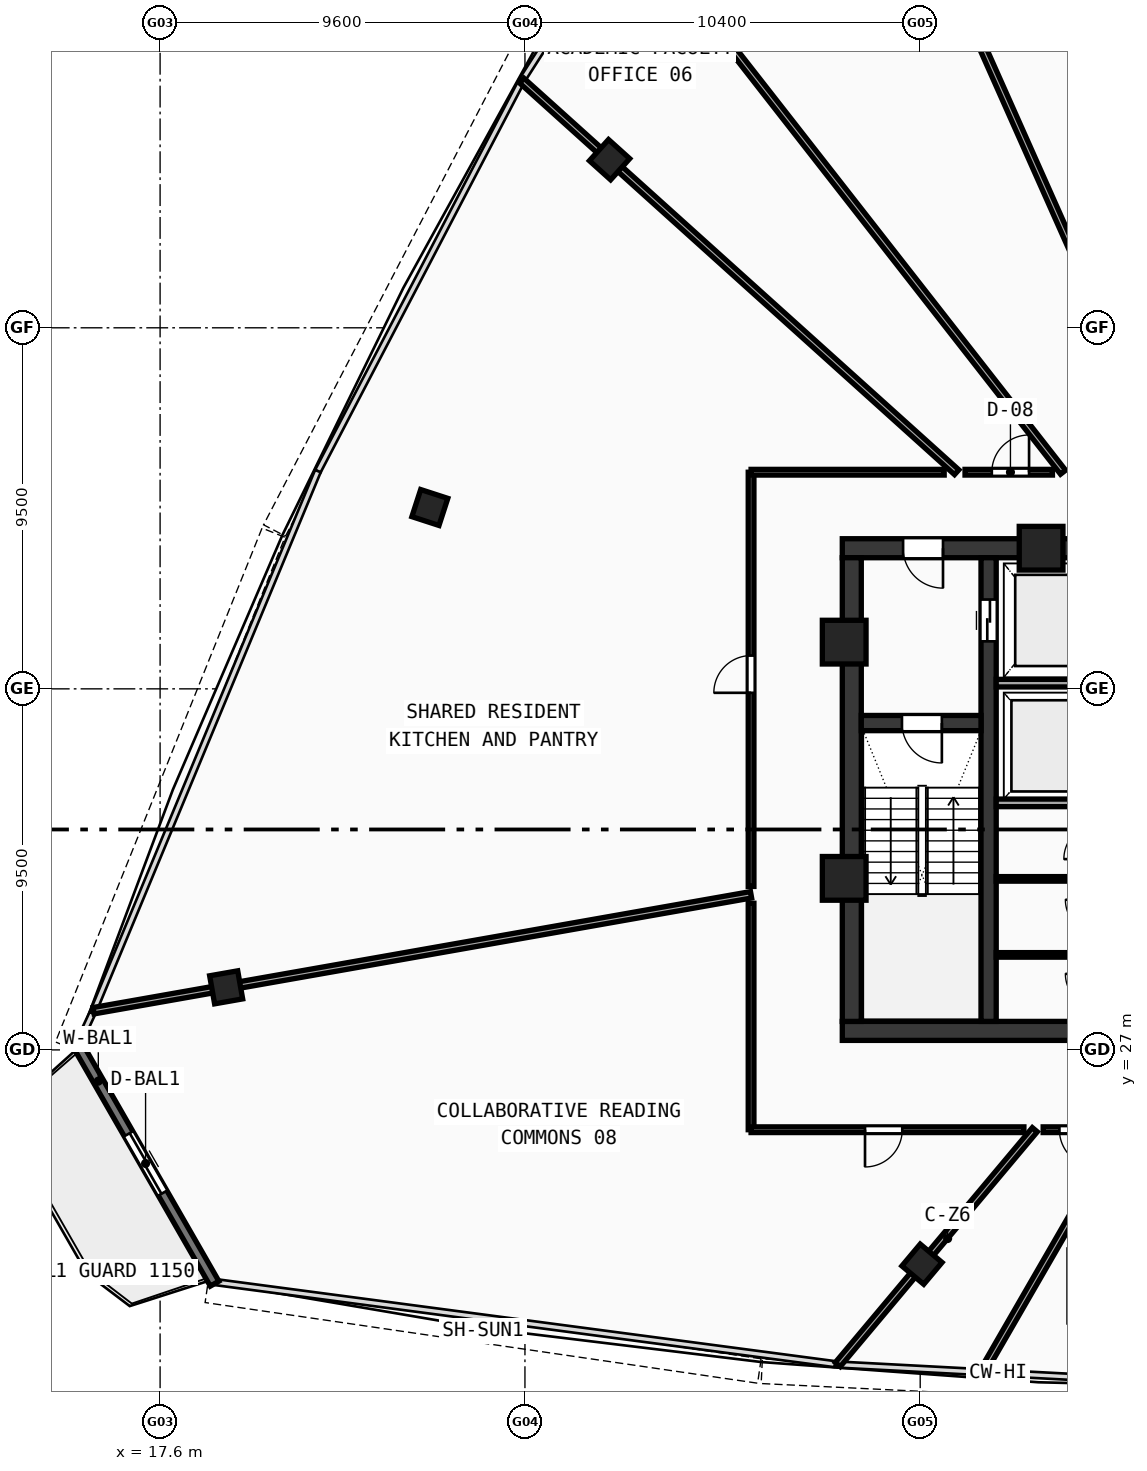
"""IFC4 building model, lengths in metres.
Left out: names, types, materials, properties, quantities, classifications, styles, units other than length and angle.
Written with IfcOpenShell. Run it as: python <this file> out.ifc"""

import sys

from ifc_helpers import new_model, si_unit, direction, frame, frame_2d, origin, origin_with_axes, origin_2d, place, context, subcontext, project, spatial, rectangle, hollow_rectangle, extrude, source, transform, mapped, element, fill, save


model = new_model("IFC4")
c1 = context("Model", 3, precision=1e-05, world=origin(), true_north=direction((0.0, 1.0)))
c2 = subcontext(c1, "Body", "Model", "MODEL_VIEW")
j1 = project(units=[si_unit("LENGTHUNIT", "METRE"), si_unit("PLANEANGLEUNIT", "RADIAN")], contexts=[c1])
p1 = place(None, origin())
s1 = spatial("IfcSite", under=j1, at=p1, CompositionType="ELEMENT")
p2 = place(p1, origin())
s2 = spatial("IfcBuilding", under=s1, at=p2, CompositionType="ELEMENT")
p3 = place(p2, frame((0.0, 0.0, 277.56)))
s3 = spatial("IfcBuildingStorey", under=s2, at=p3, CompositionType="ELEMENT", Elevation=277.56)
p4 = place(p3, frame((35.55, 27.5, 0.0), z_axis=(0.0, 0.0, 1.0), x_axis=(1.0, 0.0, 0.0)))
e1 = element("IfcWall", 1, at=p4, inside=s3, PredefinedType="SHEAR", context=c2, shape_type="SweptSolid", body=[
    extrude(rectangle(XDim=24.9, YDim=0.5, at=frame_2d((12.45, 0.0))), origin(), (0.0, 0.0, 1.0), 3.47),
])
p5 = place(p3, frame((35.55, 40.2, 0.0), z_axis=(0.0, 0.0, 1.0), x_axis=(1.0, 0.0, 0.0)))
e2 = element("IfcWall", 2, at=p5, inside=s3, PredefinedType="SHEAR", context=c2, shape_type="SweptSolid", body=[
    extrude(rectangle(XDim=11.25, YDim=0.5, at=frame_2d((5.625, 0.0))), origin(), (0.0, 0.0, 1.0), 3.47),
])
p6 = place(p5, frame((1.6, 0.0, 0.0)))
e3 = element("IfcOpeningElement", 3, at=p6, cuts=e2, PredefinedType="OPENING", context=c2, shape_type="SweptSolid", body=[
    extrude(rectangle(XDim=1.05, YDim=2.1, at=frame_2d((0.525, 1.05))), frame((0.0, 0.26, 0.0), z_axis=(0.0, -1.0, 0.0), x_axis=(1.0, 0.0, 0.0)), (0.0, 0.0, 1.0), 0.52),
])
p7 = place(p3, frame((35.8, 27.75, 0.0), z_axis=(0.0, 0.0, 1.0), x_axis=(0.0, 1.0, 0.0)))
e4 = element("IfcWall", 4, at=p7, inside=s3, PredefinedType="SHEAR", context=c2, shape_type="SweptSolid", body=[
    extrude(rectangle(XDim=12.2, YDim=0.5, at=frame_2d((6.1, 0.0))), origin(), (0.0, 0.0, 1.0), 3.47),
])
p8 = place(p3, frame((39.4, 27.75, 0.0), z_axis=(0.0, 0.0, 1.0), x_axis=(0.0, 1.0, 0.0)))
e5 = element("IfcWall", 5, at=p8, inside=s3, PredefinedType="SHEAR", context=c2, shape_type="SweptSolid", body=[
    extrude(rectangle(XDim=12.2, YDim=0.4, at=frame_2d((6.1, 0.0))), origin(), (0.0, 0.0, 1.0), 3.47),
])
p9 = place(p8, frame((10.0, 0.0, 0.0)))
e6 = element("IfcOpeningElement", 6, at=p9, cuts=e5, PredefinedType="OPENING", context=c2, shape_type="SweptSolid", body=[
    extrude(rectangle(XDim=1.1, YDim=2.1, at=frame_2d((0.55, 1.05))), frame((0.0, 0.21, 0.0), z_axis=(0.0, -1.0, 0.0), x_axis=(1.0, 0.0, 0.0)), (0.0, 0.0, 1.0), 0.42),
])
p10 = place(p3, frame((36.05, 35.6, 0.0), z_axis=(0.0, 0.0, 1.0), x_axis=(1.0, 0.0, 0.0)))
e7 = element("IfcWall", 7, at=p10, inside=s3, PredefinedType="SHEAR", context=c2, shape_type="SweptSolid", body=[
    extrude(rectangle(XDim=3.15, YDim=0.4, at=frame_2d((1.575, 0.0))), origin(), (0.0, 0.0, 1.0), 3.47),
])
p11 = place(p10, frame((1.07, 0.0, 0.0)))
e8 = element("IfcOpeningElement", 8, at=p11, cuts=e7, PredefinedType="OPENING", context=c2, shape_type="SweptSolid", body=[
    extrude(rectangle(XDim=1.05, YDim=2.1, at=frame_2d((0.525, 1.05))), frame((0.0, 0.21, 0.0), z_axis=(0.0, -1.0, 0.0), x_axis=(1.0, 0.0, 0.0)), (0.0, 0.0, 1.0), 0.42),
])
m1 = source(origin(), c2, "Body", "SweptSolid", [
    extrude(hollow_rectangle(XDim=1.15, YDim=1.15, WallThickness=0.048, at=origin_2d()), origin(), (0.0, 0.0, 1.0), 3.73),
])
for number, where, z_axis, x_axis in (
    (9, (40.781, 40.2, -0.26), (0.0, 0.0, 1.0), (1.0, 0.0, 0.0)),
    (10, (35.6, 37.729, -0.26), (0.0, 0.0, 1.0), (1.0, 0.0, 0.0)),
    (11, (35.6, 31.513, -0.26), (0.0, 0.0, 1.0), (1.0, 0.0, 0.0)),
):
    element("IfcColumn", number, at=place(p3, frame(where, z_axis=z_axis, x_axis=x_axis)), inside=s3, PredefinedType="COLUMN", context=c2, shape_type="MappedRepresentation", body=[
        mapped(m1, transform((0.0, 0.0, 0.0), scale=1.0)),
    ])
m2 = source(origin(), c2, "Body", "SweptSolid", [
    extrude(hollow_rectangle(XDim=0.75, YDim=0.75, WallThickness=0.028, at=origin_2d()), origin(), (0.0, 0.0, 1.0), 3.73),
])
for number, where, z_axis, x_axis in (
    (12, (37.647, 21.362, -0.26), (0.0, 0.0, 1.0), (0.766, -0.643, 0.0)),
    (13, (29.427, 50.424, -0.26), (0.0, 0.0, 1.0), (-0.669, -0.743, 0.0)),
    (14, (24.698, 41.271, -0.26), (0.0, 0.0, 1.0), (-0.309, -0.951, 0.0)),
    (15, (19.338, 28.646, -0.26), (0.0, 0.0, 1.0), (0.174, -0.985, 0.0)),
):
    element("IfcColumn", number, at=place(p3, frame(where, z_axis=z_axis, x_axis=x_axis)), inside=s3, PredefinedType="COLUMN", context=c2, shape_type="MappedRepresentation", body=[
        mapped(m2, transform((0.0, 0.0, 0.0), scale=1.0)),
    ])
p12 = place(p3, frame((15.402, 27.174, 0.0), z_axis=(0.0, 0.0, 1.0), x_axis=(0.497929527106, -0.867217496385, 0.0)))
e16 = element("IfcWall", 16, at=p12, inside=s3, PredefinedType="STANDARD", context=c2, shape_type="SweptSolid", body=[
    extrude(rectangle(XDim=7.293, YDim=0.26, at=frame_2d((3.647, 0.0))), origin(), (0.0, 0.0, 1.0), 3.47),
])
p13 = place(p12, frame((2.747, 0.0, 0.0)))
e17 = element("IfcOpeningElement", 17, at=p13, cuts=e16, PredefinedType="OPENING", context=c2, shape_type="SweptSolid", body=[
    extrude(rectangle(XDim=1.8, YDim=2.15, at=frame_2d((0.9, 1.075))), frame((0.0, 0.14, 0.0), z_axis=(0.0, -1.0, 0.0), x_axis=(1.0, 0.0, 0.0)), (0.0, 0.0, 1.0), 0.28),
])
for number, where, z_axis, x_axis in (
    (18, (39.6, 36.65, 0.0), (0.0, 0.0, 1.0), (1.0, 0.0, 0.0)),
    (19, (39.6, 33.5, 0.0), (0.0, 0.0, 1.0), (1.0, 0.0, 0.0)),
):
    element("IfcWall", number, at=place(p3, frame(where, z_axis=z_axis, x_axis=x_axis)), inside=s3, PredefinedType="SOLIDWALL", context=c2, shape_type="SweptSolid", body=[
        extrude(rectangle(XDim=2.72, YDim=0.2, at=frame_2d((1.36, 0.0))), origin(), (0.0, 0.0, 1.0), 3.47),
    ])
for number, where, z_axis, x_axis in (
    (20, (39.6, 29.5, 0.0), (0.0, 0.0, 1.0), (1.0, 0.0, 0.0)),
    (21, (39.6, 31.5, 0.0), (0.0, 0.0, 1.0), (1.0, 0.0, 0.0)),
):
    element("IfcWall", number, at=place(p3, frame(where, z_axis=z_axis, x_axis=x_axis)), inside=s3, PredefinedType="PARTITIONING", context=c2, shape_type="SweptSolid", body=[
        extrude(rectangle(XDim=2.72, YDim=0.12, at=frame_2d((1.36, 0.0))), origin(), (0.0, 0.0, 1.0), 3.47),
    ])
p14 = place(p3, frame((42.702, 45.6, 0.0), z_axis=(0.0, 0.0, 1.0), x_axis=(-0.406743072482, 0.91354259506, 0.0)))
e22 = element("IfcWall", 22, at=p14, inside=s3, PredefinedType="PARTITIONING", context=c2, shape_type="SweptSolid", body=[
    extrude(rectangle(XDim=20.191, YDim=0.17, at=frame_2d((10.096, 0.0))), origin(), (0.0, 0.0, 1.0), 2.87),
])
p15 = place(p3, frame((41.359, 42.2, 0.0), z_axis=(0.0, 0.0, 1.0), x_axis=(-0.615658553978, 0.788013036005, 0.0)))
e23 = element("IfcWall", 23, at=p15, inside=s3, PredefinedType="PARTITIONING", context=c2, shape_type="SweptSolid", body=[
    extrude(rectangle(XDim=18.609, YDim=0.17, at=frame_2d((9.304, 0.0))), origin(), (0.0, 0.0, 1.0), 2.87),
])
p16 = place(p3, frame((38.56, 42.2, 0.0), z_axis=(0.0, 0.0, 1.0), x_axis=(-0.743145118403, 0.669130281032, 0.0)))
e24 = element("IfcWall", 24, at=p16, inside=s3, PredefinedType="PARTITIONING", context=c2, shape_type="SweptSolid", body=[
    extrude(rectangle(XDim=15.397, YDim=0.17, at=frame_2d((7.699, 0.0))), origin(), (0.0, 0.0, 1.0), 2.87),
])
p17 = place(p3, frame((33.15, 31.082, 0.0), z_axis=(0.0, 0.0, 1.0), x_axis=(-0.984807054696, -0.173652137966, 0.0)))
e25 = element("IfcWall", 25, at=p17, inside=s3, PredefinedType="PARTITIONING", context=c2, shape_type="SweptSolid", body=[
    extrude(rectangle(XDim=17.567, YDim=0.17, at=frame_2d((8.783, 0.0))), origin(), (0.0, 0.0, 1.0), 2.87),
])
p18 = place(p3, frame((40.616, 24.9, 0.0), z_axis=(0.0, 0.0, 1.0), x_axis=(-0.642788791497, -0.76604345146, 0.0)))
e26 = element("IfcWall", 26, at=p18, inside=s3, PredefinedType="PARTITIONING", context=c2, shape_type="SweptSolid", body=[
    extrude(rectangle(XDim=8.066, YDim=0.17, at=frame_2d((4.033, 0.0))), origin(), (0.0, 0.0, 1.0), 2.87),
])
p19 = place(p3, frame((42.919, 24.9, 0.0), z_axis=(0.0, 0.0, 1.0), x_axis=(-0.499992114976, -0.866029956157, 0.0)))
e27 = element("IfcWall", 27, at=p19, inside=s3, PredefinedType="PARTITIONING", context=c2, shape_type="SweptSolid", body=[
    extrude(rectangle(XDim=7.367, YDim=0.17, at=frame_2d((3.683, 0.0))), origin(), (0.0, 0.0, 1.0), 2.87),
])
p20 = place(p3, frame((33.15, 24.9, 0.0), z_axis=(0.0, 0.0, 1.0), x_axis=(0.0, 1.0, 0.0)))
e28 = element("IfcWall", 28, at=p20, inside=s3, PredefinedType="PARTITIONING", context=c2, shape_type="SweptSolid", body=[
    extrude(rectangle(XDim=5.958, YDim=0.15, at=frame_2d((2.979, 0.0))), origin(), (0.0, 0.0, 1.0), 3.12),
])
p21 = place(p3, frame((33.15, 31.301, 0.0), z_axis=(0.0, 0.0, 1.0), x_axis=(0.0, 1.0, 0.0)))
e29 = element("IfcWall", 29, at=p21, inside=s3, PredefinedType="PARTITIONING", context=c2, shape_type="SweptSolid", body=[
    extrude(rectangle(XDim=10.899, YDim=0.15, at=frame_2d((5.449, 0.0))), origin(), (0.0, 0.0, 1.0), 2.87),
])
p22 = place(p21, frame((5.094, 0.0, 0.0)))
e30 = element("IfcOpeningElement", 30, at=p22, cuts=e29, PredefinedType="OPENING", context=c2, shape_type="SweptSolid", body=[
    extrude(rectangle(XDim=0.98, YDim=2.12, at=frame_2d((0.49, 1.06))), frame((0.0, 0.085, 0.0), z_axis=(0.0, -1.0, 0.0), x_axis=(1.0, 0.0, 0.0)), (0.0, 0.0, 1.0), 0.17),
])
p23 = place(p3, frame((33.15, 42.2, 0.0), z_axis=(0.0, 0.0, 1.0), x_axis=(1.0, 0.0, 0.0)))
e31 = element("IfcWall", 31, at=p23, inside=s3, PredefinedType="PARTITIONING", context=c2, shape_type="SweptSolid", body=[
    extrude(rectangle(XDim=5.081, YDim=0.15, at=frame_2d((2.541, 0.0))), origin(), (0.0, 0.0, 1.0), 3.12),
])
p24 = place(p3, frame((38.78, 42.2, 0.0), z_axis=(0.0, 0.0, 1.0), x_axis=(1.0, 0.0, 0.0)))
e32 = element("IfcWall", 32, at=p24, inside=s3, PredefinedType="PARTITIONING", context=c2, shape_type="SweptSolid", body=[
    extrude(rectangle(XDim=2.3, YDim=0.15, at=frame_2d((1.15, 0.0))), origin(), (0.0, 0.0, 1.0), 2.87),
])
p25 = place(p24, frame((0.705, 0.0, 0.0)))
e33 = element("IfcOpeningElement", 33, at=p25, cuts=e32, PredefinedType="OPENING", context=c2, shape_type="SweptSolid", body=[
    extrude(rectangle(XDim=0.98, YDim=2.12, at=frame_2d((0.49, 1.06))), frame((0.0, 0.085, 0.0), z_axis=(0.0, -1.0, 0.0), x_axis=(1.0, 0.0, 0.0)), (0.0, 0.0, 1.0), 0.17),
])
p26 = place(p3, frame((42.665, 24.9, 0.0), z_axis=(0.0, 0.0, 1.0), x_axis=(-1.0, 0.0, 0.0)))
e34 = element("IfcWall", 34, at=p26, inside=s3, PredefinedType="PARTITIONING", context=c2, shape_type="SweptSolid", body=[
    extrude(rectangle(XDim=1.83, YDim=0.15, at=frame_2d((0.915, 0.0))), origin(), (0.0, 0.0, 1.0), 3.47),
])
p27 = place(p26, frame((0.423, 0.0, 0.0)))
e35 = element("IfcOpeningElement", 35, at=p27, cuts=e34, PredefinedType="OPENING", context=c2, shape_type="SweptSolid", body=[
    extrude(rectangle(XDim=0.98, YDim=2.12, at=frame_2d((0.49, 1.06))), frame((0.0, 0.085, 0.0), z_axis=(0.0, -1.0, 0.0), x_axis=(1.0, 0.0, 0.0)), (0.0, 0.0, 1.0), 0.17),
])
p28 = place(p3, frame((40.329, 24.9, 0.0), z_axis=(0.0, 0.0, 1.0), x_axis=(-1.0, 0.0, 0.0)))
e36 = element("IfcWall", 36, at=p28, inside=s3, PredefinedType="PARTITIONING", context=c2, shape_type="SweptSolid", body=[
    extrude(rectangle(XDim=7.179, YDim=0.15, at=frame_2d((3.589, 0.0))), origin(), (0.0, 0.0, 1.0), 3.12),
])
p29 = place(p28, frame((3.201, 0.0, 0.0)))
e37 = element("IfcOpeningElement", 37, at=p29, cuts=e36, PredefinedType="OPENING", context=c2, shape_type="SweptSolid", body=[
    extrude(rectangle(XDim=0.98, YDim=2.12, at=frame_2d((0.49, 1.06))), frame((0.0, 0.085, 0.0), z_axis=(0.0, -1.0, 0.0), x_axis=(1.0, 0.0, 0.0)), (0.0, 0.0, 1.0), 0.17),
])
m3 = source(origin(), c2, "Body", "SweptSolid", [
    extrude(rectangle(XDim=1.8, YDim=2.15, at=frame_2d((0.9, 1.075))), frame((0.0, 0.025, 0.0), z_axis=(0.0, -1.0, 0.0), x_axis=(1.0, 0.0, 0.0)), (0.0, 0.0, 1.0), 0.05),
])
p30 = place(p13, origin_with_axes())
e38 = element("IfcDoor", 38, at=p30, inside=s3, OperationType="DOUBLE_DOOR_SLIDING", PredefinedType="DOOR", context=c2, shape_type="MappedRepresentation", body=[
    mapped(m3, transform((0.0, 0.0, 0.0), scale=1.0)),
])
fill(e17, e38)
m4 = source(origin(), c2, "Body", "SweptSolid", [
    extrude(rectangle(XDim=1.05, YDim=2.1, at=frame_2d((0.525, 1.05))), frame((0.0, 0.025, 0.0), z_axis=(0.0, -1.0, 0.0), x_axis=(1.0, 0.0, 0.0)), (0.0, 0.0, 1.0), 0.05),
])
p31 = place(p11, frame((1.05, 0.0, 0.0), z_axis=(0.0, 0.0, 1.0), x_axis=(-1.0, 0.0, 0.0)))
e39 = element("IfcDoor", 39, at=p31, inside=s3, OperationType="SINGLE_SWING_LEFT", PredefinedType="DOOR", context=c2, shape_type="MappedRepresentation", body=[
    mapped(m4, transform((0.0, 0.0, 0.0), scale=1.0)),
])
fill(e8, e39)
p32 = place(p6, frame((1.05, 0.0, 0.0), z_axis=(0.0, 0.0, 1.0), x_axis=(-1.0, 0.0, 0.0)))
e40 = element("IfcDoor", 40, at=p32, inside=s3, OperationType="SINGLE_SWING_LEFT", PredefinedType="DOOR", context=c2, shape_type="MappedRepresentation", body=[
    mapped(m4, transform((0.0, 0.0, 0.0), scale=1.0)),
])
fill(e3, e40)
m5 = source(origin(), c2, "Body", "SweptSolid", [
    extrude(rectangle(XDim=1.1, YDim=2.1, at=frame_2d((0.55, 1.05))), frame((0.0, 0.025, 0.0), z_axis=(0.0, -1.0, 0.0), x_axis=(1.0, 0.0, 0.0)), (0.0, 0.0, 1.0), 0.05),
])
p33 = place(p9, frame((1.1, 0.0, 0.0), z_axis=(0.0, 0.0, 1.0), x_axis=(-1.0, 0.0, 0.0)))
e41 = element("IfcDoor", 41, at=p33, inside=s3, OperationType="DOUBLE_DOOR_SLIDING", PredefinedType="DOOR", context=c2, shape_type="MappedRepresentation", body=[
    mapped(m5, transform((0.0, 0.0, 0.0), scale=1.0)),
])
fill(e6, e41)
m6 = source(origin(), c2, "Body", "SweptSolid", [
    extrude(rectangle(XDim=0.98, YDim=2.12, at=frame_2d((0.49, 1.06))), frame((0.0, 0.025, 0.0), z_axis=(0.0, -1.0, 0.0), x_axis=(1.0, 0.0, 0.0)), (0.0, 0.0, 1.0), 0.05),
])
p34 = place(p25, origin_with_axes())
e42 = element("IfcDoor", 42, at=p34, inside=s3, OperationType="SINGLE_SWING_RIGHT", PredefinedType="DOOR", context=c2, shape_type="MappedRepresentation", body=[
    mapped(m6, transform((0.0, 0.0, 0.0), scale=1.0)),
])
fill(e33, e42)
p35 = place(p22, origin_with_axes())
e43 = element("IfcDoor", 43, at=p35, inside=s3, OperationType="SINGLE_SWING_LEFT", PredefinedType="DOOR", context=c2, shape_type="MappedRepresentation", body=[
    mapped(m6, transform((0.0, 0.0, 0.0), scale=1.0)),
])
fill(e30, e43)
p36 = place(p29, origin_with_axes())
e44 = element("IfcDoor", 44, at=p36, inside=s3, OperationType="SINGLE_SWING_RIGHT", PredefinedType="DOOR", context=c2, shape_type="MappedRepresentation", body=[
    mapped(m6, transform((0.0, 0.0, 0.0), scale=1.0)),
])
fill(e37, e44)
p37 = place(p27, origin_with_axes())
e45 = element("IfcDoor", 45, at=p37, inside=s3, OperationType="SINGLE_SWING_LEFT", PredefinedType="DOOR", context=c2, shape_type="MappedRepresentation", body=[
    mapped(m6, transform((0.0, 0.0, 0.0), scale=1.0)),
])
fill(e35, e45)
save(model, sys.argv[1])
